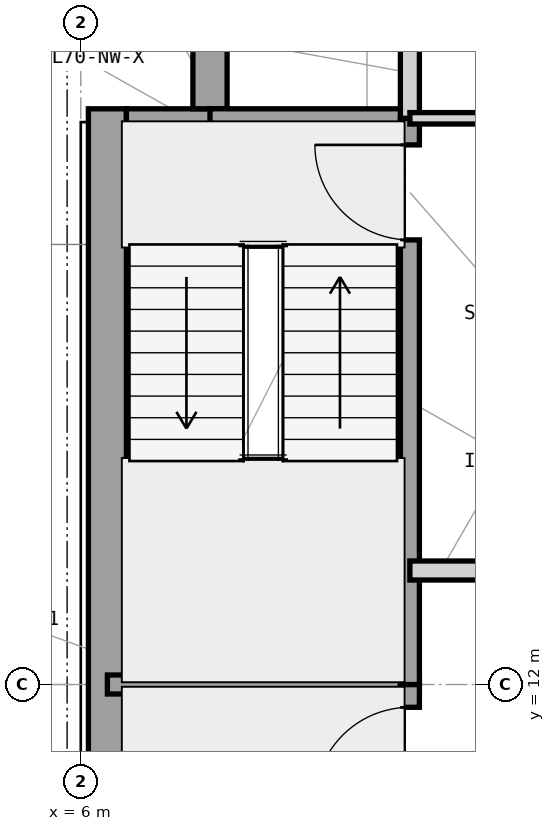
"""IFC4 building model, lengths in metres.
Left out: names, types, materials, properties, quantities, classifications, styles, units other than length and angle.
Written with IfcOpenShell. Run it as: python <this file> out.ifc"""

import sys

from ifc_helpers import new_model, si_unit, direction, frame, frame_2d, origin, place, context, subcontext, project, spatial, rectangle, extrude, element, fill, save


model = new_model("IFC4")
c1 = context("Model", 3, precision=1e-05, world=origin(), true_north=direction((0.0, 1.0)))
c2 = subcontext(c1, "Body", "Model", "MODEL_VIEW")
j1 = project(units=[si_unit("LENGTHUNIT", "METRE"), si_unit("PLANEANGLEUNIT", "RADIAN")], contexts=[c1])
p1 = place(None, origin())
s1 = spatial("IfcSite", under=j1, at=p1, CompositionType="ELEMENT")
p2 = place(p1, origin())
s2 = spatial("IfcBuilding", under=s1, at=p2, CompositionType="ELEMENT")
p3 = place(p2, frame((0.0, 0.0, 285.9)))
s3 = spatial("IfcBuildingStorey", under=s2, at=p3, CompositionType="ELEMENT", Elevation=285.9)
p4 = place(p3, frame((6.35, 4.425, 0.0), z_axis=(0.0, 0.0, 1.0), x_axis=(0.0, 1.0, 0.0)))
e1 = element("IfcWall", 1, at=p4, inside=s3, PredefinedType="SHEAR", context=c2, shape_type="SweptSolid", body=[
    extrude(rectangle(XDim=15.15, YDim=0.5, at=frame_2d((7.575, 0.0))), origin(), (0.0, 0.0, 1.0), 3.9),
])
p5 = place(p3, frame((6.6, 19.35, 0.0), z_axis=(0.0, 0.0, 1.0), x_axis=(1.0, 0.0, 0.0)))
e2 = element("IfcWall", 2, at=p5, inside=s3, PredefinedType="SHEAR", context=c2, shape_type="SweptSolid", body=[
    extrude(rectangle(XDim=1.325, YDim=0.45, at=frame_2d((0.663, 0.0))), origin(), (0.0, 0.0, 1.0), 3.9),
])
p6 = place(p3, frame((7.7, 19.575, 0.0), z_axis=(0.0, 0.0, 1.0), x_axis=(0.0, 1.0, 0.0)))
e3 = element("IfcWall", 3, at=p6, inside=s3, PredefinedType="SHEAR", context=c2, shape_type="SweptSolid", body=[
    extrude(rectangle(XDim=0.825, YDim=0.45, at=frame_2d((0.413, 0.0))), origin(), (0.0, 0.0, 1.0), 3.9),
])
p7 = place(p3, frame((6.35, 12.0, 0.0), z_axis=(0.0, 0.0, 1.0), x_axis=(1.0, 0.0, 0.0)))
e4 = element("IfcWall", 4, at=p7, inside=s3, PredefinedType="SHEAR", context=c2, shape_type="SweptSolid", body=[
    extrude(rectangle(XDim=4.105, YDim=0.25, at=frame_2d((2.052, 0.0))), origin(), (0.0, 0.0, 1.0), 3.9),
])
p8 = place(p3, frame((7.7, 19.45, 0.0), z_axis=(0.0, 0.0, 1.0), x_axis=(1.0, 0.0, 0.0)))
e5 = element("IfcWall", 5, at=p8, inside=s3, PredefinedType="SHEAR", context=c2, shape_type="SweptSolid", body=[
    extrude(rectangle(XDim=2.755, YDim=0.25, at=frame_2d((1.377, 0.0))), origin(), (0.0, 0.0, 1.0), 3.9),
])
p9 = place(p3, frame((10.33, 4.55, 0.0), z_axis=(0.0, 0.0, 1.0), x_axis=(0.0, 1.0, 0.0)))
e6 = element("IfcWall", 6, at=p9, inside=s3, PredefinedType="SHEAR", context=c2, shape_type="SweptSolid", body=[
    extrude(rectangle(XDim=7.45, YDim=0.25, at=frame_2d((3.725, 0.0))), origin(), (0.0, 0.0, 1.0), 3.9),
])
p10 = place(p9, frame((5.9, 0.0, 0.0)))
e7 = element("IfcOpeningElement", 7, at=p10, cuts=e6, PredefinedType="OPENING", context=c2, shape_type="SweptSolid", body=[
    extrude(rectangle(XDim=1.25, YDim=2.2, at=frame_2d((0.625, 1.1))), frame((0.0, 0.135, 0.0), z_axis=(0.0, -1.0, 0.0), x_axis=(1.0, 0.0, 0.0)), (0.0, 0.0, 1.0), 0.27),
])
p11 = place(p3, frame((10.33, 12.0, 0.0), z_axis=(0.0, 0.0, 1.0), x_axis=(0.0, 1.0, 0.0)))
e8 = element("IfcWall", 8, at=p11, inside=s3, PredefinedType="SHEAR", context=c2, shape_type="SweptSolid", body=[
    extrude(rectangle(XDim=7.45, YDim=0.25, at=frame_2d((3.725, 0.0))), origin(), (0.0, 0.0, 1.0), 3.9),
])
p12 = place(p11, frame((5.85, 0.0, 0.0)))
e9 = element("IfcOpeningElement", 9, at=p12, cuts=e8, PredefinedType="OPENING", context=c2, shape_type="SweptSolid", body=[
    extrude(rectangle(XDim=1.25, YDim=2.2, at=frame_2d((0.625, 1.1))), frame((0.0, 0.135, 0.0), z_axis=(0.0, -1.0, 0.0), x_axis=(1.0, 0.0, 0.0)), (0.0, 0.0, 1.0), 0.27),
])
p13 = place(p3, frame((10.33, 19.45, 0.0), z_axis=(0.0, 0.0, 1.0), x_axis=(0.0, 1.0, 0.0)))
e10 = element("IfcWall", 10, at=p13, inside=s3, PredefinedType="PARTITIONING", context=c2, shape_type="SweptSolid", body=[
    extrude(rectangle(XDim=1.2, YDim=0.25, at=frame_2d((0.6, 0.0))), origin(), (0.0, 0.0, 1.0), 3.705),
])
p14 = place(p3, frame((10.33, 13.5, 0.0), z_axis=(0.0, 0.0, 1.0), x_axis=(1.0, 0.0, 0.0)))
e11 = element("IfcWall", 11, at=p14, inside=s3, PredefinedType="PARTITIONING", context=c2, shape_type="SweptSolid", body=[
    extrude(rectangle(XDim=1.62, YDim=0.25, at=frame_2d((0.81, 0.0))), origin(), (0.0, 0.0, 1.0), 3.354),
])
p15 = place(p3, frame((10.33, 19.45, 0.0), z_axis=(0.0, 0.0, 1.0), x_axis=(1.0, 0.0, 0.0)))
e12 = element("IfcWall", 12, at=p15, inside=s3, PredefinedType="PARTITIONING", context=c2, shape_type="SweptSolid", body=[
    extrude(rectangle(XDim=3.82, YDim=0.15, at=frame_2d((1.91, 0.0))), origin(), (0.0, 0.0, 1.0), 3.705),
])
p16 = place(p15, frame((1.25, 0.0, 0.0)))
e13 = element("IfcOpeningElement", 13, at=p16, cuts=e12, PredefinedType="OPENING", context=c2, shape_type="SweptSolid", body=[
    extrude(rectangle(XDim=0.95, YDim=2.1, at=frame_2d((0.475, 1.05))), frame((0.0, 0.085, 0.0), z_axis=(0.0, -1.0, 0.0), x_axis=(1.0, 0.0, 0.0)), (0.0, 0.0, 1.0), 0.17),
])
p17 = place(p10, origin())
e14 = element("IfcDoor", 14, at=p17, inside=s3, OperationType="SINGLE_SWING_LEFT", PredefinedType="DOOR", context=c2, shape_type="SweptSolid", body=[
    extrude(rectangle(XDim=1.25, YDim=2.2, at=frame_2d((0.625, 1.1))), frame((0.0, 0.025, 0.0), z_axis=(0.0, -1.0, 0.0), x_axis=(1.0, 0.0, 0.0)), (0.0, 0.0, 1.0), 0.05),
])
fill(e7, e14)
p18 = place(p12, origin())
e15 = element("IfcDoor", 15, at=p18, inside=s3, OperationType="SINGLE_SWING_RIGHT", PredefinedType="DOOR", context=c2, shape_type="SweptSolid", body=[
    extrude(rectangle(XDim=1.25, YDim=2.2, at=frame_2d((0.625, 1.1))), frame((0.0, 0.025, 0.0), z_axis=(0.0, -1.0, 0.0), x_axis=(1.0, 0.0, 0.0)), (0.0, 0.0, 1.0), 0.05),
])
fill(e9, e15)
save(model, sys.argv[1])
